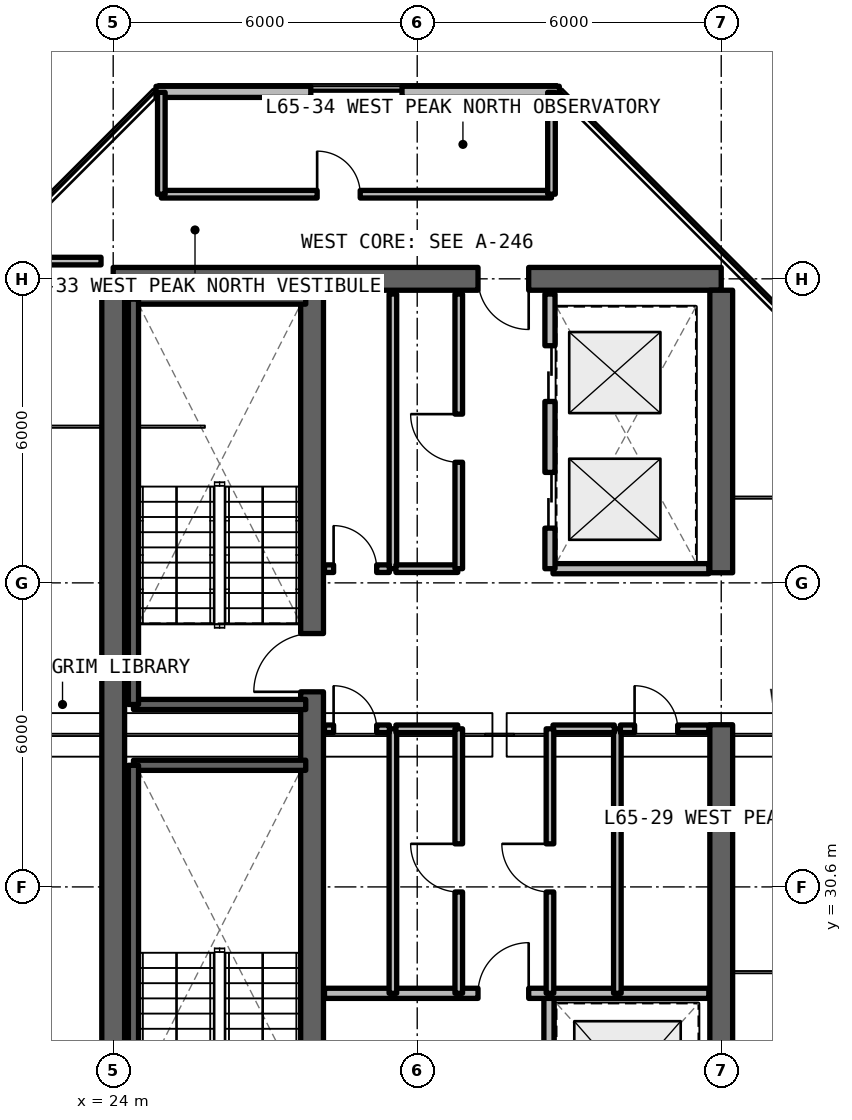
"""IFC4 building model, lengths in metres.
Left out: names, types, materials, properties, quantities, classifications, styles, units other than length and angle.
Written with IfcOpenShell. Run it as: python <this file> out.ifc"""

import sys

from ifc_helpers import new_model, si_unit, direction, frame, frame_2d, origin, place, context, subcontext, project, spatial, rectangle, extrude, element, fill, save


model = new_model("IFC4")
c1 = context("Model", 3, precision=1e-05, world=origin(), true_north=direction((0.0, 1.0)))
c2 = subcontext(c1, "Body", "Model", "MODEL_VIEW")
j1 = project(units=[si_unit("LENGTHUNIT", "METRE"), si_unit("PLANEANGLEUNIT", "RADIAN")], contexts=[c1])
p1 = place(None, origin())
s1 = spatial("IfcSite", under=j1, at=p1, CompositionType="ELEMENT")
p2 = place(p1, origin())
s2 = spatial("IfcBuilding", under=s1, at=p2, CompositionType="ELEMENT")
p3 = place(p2, frame((0.0, 0.0, 232.65)))
s3 = spatial("IfcBuildingStorey", under=s2, at=p3, CompositionType="ELEMENT", Elevation=232.65)
p4 = place(p3, frame((36.0, 42.6, 0.0), z_axis=(0.0, 0.0, 1.0), x_axis=(-1.0, 0.0, 0.0)))
e1 = element("IfcWall", 1, at=p4, inside=s3, PredefinedType="SHEAR", context=c2, shape_type="SweptSolid", body=[
    extrude(rectangle(XDim=12.0, YDim=0.45, at=frame_2d((6.0, 0.0))), origin(), (0.0, 0.0, 1.0), 3.3),
])
p5 = place(p4, frame((3.8, 0.0, 0.0)))
e2 = element("IfcOpeningElement", 2, at=p5, cuts=e1, PredefinedType="OPENING", context=c2, shape_type="SweptSolid", body=[
    extrude(rectangle(XDim=1.0, YDim=2.15, at=frame_2d((0.5, 1.075))), frame((0.0, 0.235, 0.0), z_axis=(0.0, -1.0, 0.0), x_axis=(1.0, 0.0, 0.0)), (0.0, 0.0, 1.0), 0.47),
])
p6 = place(p3, frame((24.0, 24.825, 0.0), z_axis=(0.0, 0.0, 1.0), x_axis=(0.0, 1.0, 0.0)))
e3 = element("IfcWall", 3, at=p6, inside=s3, PredefinedType="SHEAR", context=c2, shape_type="SweptSolid", body=[
    extrude(rectangle(XDim=17.55, YDim=0.45, at=frame_2d((8.775, 0.0))), origin(), (0.0, 0.0, 1.0), 3.3),
])
p7 = place(p3, frame((36.0, 24.825, 0.0), z_axis=(0.0, 0.0, 1.0), x_axis=(0.0, 1.0, 0.0)))
e4 = element("IfcWall", 4, at=p7, inside=s3, PredefinedType="SHEAR", context=c2, shape_type="SweptSolid", body=[
    extrude(rectangle(XDim=8.975, YDim=0.45, at=frame_2d((4.488, 0.0))), origin(), (0.0, 0.0, 1.0), 3.3),
])
p8 = place(p3, frame((36.0, 36.8, 0.0), z_axis=(0.0, 0.0, 1.0), x_axis=(0.0, 1.0, 0.0)))
e5 = element("IfcWall", 5, at=p8, inside=s3, PredefinedType="SHEAR", context=c2, shape_type="SweptSolid", body=[
    extrude(rectangle(XDim=5.575, YDim=0.45, at=frame_2d((2.788, 0.0))), origin(), (0.0, 0.0, 1.0), 3.3),
])
p9 = place(p3, frame((27.925, 24.825, 0.0), z_axis=(0.0, 0.0, 1.0), x_axis=(0.0, 1.0, 0.0)))
e6 = element("IfcWall", 6, at=p9, inside=s3, PredefinedType="SHEAR", context=c2, shape_type="SweptSolid", body=[
    extrude(rectangle(XDim=17.55, YDim=0.45, at=frame_2d((8.775, 0.0))), origin(), (0.0, 0.0, 1.0), 3.3),
])
p10 = place(p9, frame((0.425, 0.0, 0.0)))
e7 = element("IfcOpeningElement", 7, at=p10, cuts=e6, PredefinedType="OPENING", context=c2, shape_type="SweptSolid", body=[
    extrude(rectangle(XDim=1.15, YDim=2.15, at=frame_2d((0.575, 1.075))), frame((0.0, 0.235, 0.0), z_axis=(0.0, -1.0, 0.0), x_axis=(1.0, 0.0, 0.0)), (0.0, 0.0, 1.0), 0.47),
])
p11 = place(p9, frame((9.625, 0.0, 0.0)))
e8 = element("IfcOpeningElement", 8, at=p11, cuts=e6, PredefinedType="OPENING", context=c2, shape_type="SweptSolid", body=[
    extrude(rectangle(XDim=1.15, YDim=2.15, at=frame_2d((0.575, 1.075))), frame((0.0, 0.235, 0.0), z_axis=(0.0, -1.0, 0.0), x_axis=(1.0, 0.0, 0.0)), (0.0, 0.0, 1.0), 0.47),
])
p12 = place(p3, frame((32.804, 46.29, 0.0), z_axis=(0.0, 0.0, 1.0), x_axis=(-1.0, 0.0, 0.0)))
e9 = element("IfcWall", 9, at=p12, inside=s3, PredefinedType="SOLIDWALL", context=c2, shape_type="SweptSolid", body=[
    extrude(rectangle(XDim=7.959, YDim=0.22, at=frame_2d((3.979, 0.0))), origin(), (0.0, 0.0, 1.0), 3.08),
])
p13 = place(p12, frame((3.104, 0.0, 0.78)))
e10 = element("IfcOpeningElement", 10, at=p13, cuts=e9, PredefinedType="OPENING", context=c2, shape_type="SweptSolid", body=[
    extrude(rectangle(XDim=1.8, YDim=1.66, at=frame_2d((0.9, 0.83))), frame((0.0, 0.12, 0.0), z_axis=(0.0, -1.0, 0.0), x_axis=(1.0, 0.0, 0.0)), (0.0, 0.0, 1.0), 0.24),
])
p14 = place(p3, frame((32.6, 24.92, 0.0), z_axis=(0.0, 0.0, 1.0), x_axis=(0.0, 1.0, 0.0)))
e11 = element("IfcWall", 11, at=p14, inside=s3, PredefinedType="SOLIDWALL", context=c2, shape_type="SweptSolid", body=[
    extrude(rectangle(XDim=3.58, YDim=0.2, at=frame_2d((1.79, 0.0))), origin(), (0.0, 0.0, 1.0), 2.35),
])
p15 = place(p14, frame((1.3, 0.0, 0.0)))
e12 = element("IfcOpeningElement", 12, at=p15, cuts=e11, PredefinedType="OPENING", context=c2, shape_type="SweptSolid", body=[
    extrude(rectangle(XDim=1.1, YDim=2.2, at=frame_2d((0.55, 1.1))), frame((0.0, 0.11, 0.0), z_axis=(0.0, -1.0, 0.0), x_axis=(1.0, 0.0, 0.0)), (0.0, 0.0, 1.0), 0.22),
])
p16 = place(p3, frame((28.17, 28.5, 0.0), z_axis=(0.0, 0.0, 1.0), x_axis=(1.0, 0.0, 0.0)))
e13 = element("IfcWall", 13, at=p16, inside=s3, PredefinedType="SOLIDWALL", context=c2, shape_type="SweptSolid", body=[
    extrude(rectangle(XDim=7.585, YDim=0.2, at=frame_2d((3.792, 0.0))), origin(), (0.0, 0.0, 1.0), 2.35),
])
p17 = place(p16, frame((3.03, 0.0, 0.0)))
e14 = element("IfcOpeningElement", 14, at=p17, cuts=e13, PredefinedType="OPENING", context=c2, shape_type="SweptSolid", body=[
    extrude(rectangle(XDim=1.0, YDim=2.15, at=frame_2d((0.5, 1.075))), frame((0.0, 0.11, 0.0), z_axis=(0.0, -1.0, 0.0), x_axis=(1.0, 0.0, 0.0)), (0.0, 0.0, 1.0), 0.22),
])
p18 = place(p3, frame((29.52, 28.5, 0.0), z_axis=(0.0, 0.0, 1.0), x_axis=(0.0, 1.0, 0.0)))
e15 = element("IfcWall", 15, at=p18, inside=s3, PredefinedType="SOLIDWALL", context=c2, shape_type="SweptSolid", body=[
    extrude(rectangle(XDim=5.22, YDim=0.15, at=frame_2d((2.61, 0.0))), origin(), (0.0, 0.0, 1.0), 2.35),
])
p19 = place(p3, frame((28.17, 33.72, 0.0), z_axis=(0.0, 0.0, 1.0), x_axis=(1.0, 0.0, 0.0)))
e16 = element("IfcWall", 16, at=p19, inside=s3, PredefinedType="SOLIDWALL", context=c2, shape_type="SweptSolid", body=[
    extrude(rectangle(XDim=1.28, YDim=0.15, at=frame_2d((0.64, 0.0))), origin(), (0.0, 0.0, 1.0), 2.35),
])
p20 = place(p19, frame((0.18, 0.0, 0.0)))
e17 = element("IfcOpeningElement", 17, at=p20, cuts=e16, PredefinedType="OPENING", context=c2, shape_type="SweptSolid", body=[
    extrude(rectangle(XDim=0.85, YDim=2.1, at=frame_2d((0.425, 1.05))), frame((0.0, 0.085, 0.0), z_axis=(0.0, -1.0, 0.0), x_axis=(1.0, 0.0, 0.0)), (0.0, 0.0, 1.0), 0.17),
])
p21 = place(p3, frame((29.58, 33.72, 0.0), z_axis=(0.0, 0.0, 1.0), x_axis=(1.0, 0.0, 0.0)))
e18 = element("IfcWall", 18, at=p21, inside=s3, PredefinedType="SOLIDWALL", context=c2, shape_type="SweptSolid", body=[
    extrude(rectangle(XDim=1.22, YDim=0.15, at=frame_2d((0.61, 0.0))), origin(), (0.0, 0.0, 1.0), 2.35),
])
p22 = place(p3, frame((30.82, 28.5, 0.0), z_axis=(0.0, 0.0, 1.0), x_axis=(0.0, 1.0, 0.0)))
e19 = element("IfcWall", 19, at=p22, inside=s3, PredefinedType="SOLIDWALL", context=c2, shape_type="SweptSolid", body=[
    extrude(rectangle(XDim=5.22, YDim=0.15, at=frame_2d((2.61, 0.0))), origin(), (0.0, 0.0, 1.0), 2.35),
])
p23 = place(p22, frame((2.0, 0.0, 0.0)))
e20 = element("IfcOpeningElement", 20, at=p23, cuts=e19, PredefinedType="OPENING", context=c2, shape_type="SweptSolid", body=[
    extrude(rectangle(XDim=0.95, YDim=2.15, at=frame_2d((0.475, 1.075))), frame((0.0, 0.085, 0.0), z_axis=(0.0, -1.0, 0.0), x_axis=(1.0, 0.0, 0.0)), (0.0, 0.0, 1.0), 0.17),
])
p24 = place(p3, frame((33.95, 28.5, 0.0), z_axis=(0.0, 0.0, 1.0), x_axis=(0.0, 1.0, 0.0)))
e21 = element("IfcWall", 21, at=p24, inside=s3, PredefinedType="SOLIDWALL", context=c2, shape_type="SweptSolid", body=[
    extrude(rectangle(XDim=5.22, YDim=0.15, at=frame_2d((2.61, 0.0))), origin(), (0.0, 0.0, 1.0), 2.35),
])
p25 = place(p3, frame((32.68, 33.72, 0.0), z_axis=(0.0, 0.0, 1.0), x_axis=(1.0, 0.0, 0.0)))
e22 = element("IfcWall", 22, at=p25, inside=s3, PredefinedType="SOLIDWALL", context=c2, shape_type="SweptSolid", body=[
    extrude(rectangle(XDim=1.21, YDim=0.15, at=frame_2d((0.605, 0.0))), origin(), (0.0, 0.0, 1.0), 2.35),
])
p26 = place(p3, frame((34.01, 33.72, 0.0), z_axis=(0.0, 0.0, 1.0), x_axis=(1.0, 0.0, 0.0)))
e23 = element("IfcWall", 23, at=p26, inside=s3, PredefinedType="SOLIDWALL", context=c2, shape_type="SweptSolid", body=[
    extrude(rectangle(XDim=1.745, YDim=0.15, at=frame_2d((0.873, 0.0))), origin(), (0.0, 0.0, 1.0), 2.35),
])
p27 = place(p26, frame((0.28, 0.0, 0.0)))
e24 = element("IfcOpeningElement", 24, at=p27, cuts=e23, PredefinedType="OPENING", context=c2, shape_type="SweptSolid", body=[
    extrude(rectangle(XDim=0.85, YDim=2.1, at=frame_2d((0.425, 1.05))), frame((0.0, 0.085, 0.0), z_axis=(0.0, -1.0, 0.0), x_axis=(1.0, 0.0, 0.0)), (0.0, 0.0, 1.0), 0.17),
])
p28 = place(p3, frame((32.62, 28.5, 0.0), z_axis=(0.0, 0.0, 1.0), x_axis=(0.0, 1.0, 0.0)))
e25 = element("IfcWall", 25, at=p28, inside=s3, PredefinedType="SOLIDWALL", context=c2, shape_type="SweptSolid", body=[
    extrude(rectangle(XDim=5.22, YDim=0.15, at=frame_2d((2.61, 0.0))), origin(), (0.0, 0.0, 1.0), 2.35),
])
p29 = place(p28, frame((2.0, 0.0, 0.0)))
e26 = element("IfcOpeningElement", 26, at=p29, cuts=e25, PredefinedType="OPENING", context=c2, shape_type="SweptSolid", body=[
    extrude(rectangle(XDim=0.95, YDim=2.15, at=frame_2d((0.475, 1.075))), frame((0.0, 0.085, 0.0), z_axis=(0.0, -1.0, 0.0), x_axis=(1.0, 0.0, 0.0)), (0.0, 0.0, 1.0), 0.17),
])
p30 = place(p3, frame((29.52, 36.88, 0.0), z_axis=(0.0, 0.0, 1.0), x_axis=(0.0, 1.0, 0.0)))
e27 = element("IfcWall", 27, at=p30, inside=s3, PredefinedType="SOLIDWALL", context=c2, shape_type="SweptSolid", body=[
    extrude(rectangle(XDim=5.42, YDim=0.15, at=frame_2d((2.71, 0.0))), origin(), (0.0, 0.0, 1.0), 2.35),
])
p31 = place(p3, frame((28.17, 36.88, 0.0), z_axis=(0.0, 0.0, 1.0), x_axis=(1.0, 0.0, 0.0)))
e28 = element("IfcWall", 28, at=p31, inside=s3, PredefinedType="SOLIDWALL", context=c2, shape_type="SweptSolid", body=[
    extrude(rectangle(XDim=1.28, YDim=0.15, at=frame_2d((0.64, 0.0))), origin(), (0.0, 0.0, 1.0), 2.35),
])
p32 = place(p31, frame((0.18, 0.0, 0.0)))
e29 = element("IfcOpeningElement", 29, at=p32, cuts=e28, PredefinedType="OPENING", context=c2, shape_type="SweptSolid", body=[
    extrude(rectangle(XDim=0.85, YDim=2.1, at=frame_2d((0.425, 1.05))), frame((0.0, 0.085, 0.0), z_axis=(0.0, -1.0, 0.0), x_axis=(1.0, 0.0, 0.0)), (0.0, 0.0, 1.0), 0.17),
])
p33 = place(p3, frame((29.58, 36.88, 0.0), z_axis=(0.0, 0.0, 1.0), x_axis=(1.0, 0.0, 0.0)))
e30 = element("IfcWall", 30, at=p33, inside=s3, PredefinedType="SOLIDWALL", context=c2, shape_type="SweptSolid", body=[
    extrude(rectangle(XDim=1.22, YDim=0.15, at=frame_2d((0.61, 0.0))), origin(), (0.0, 0.0, 1.0), 2.35),
])
p34 = place(p3, frame((30.82, 36.88, 0.0), z_axis=(0.0, 0.0, 1.0), x_axis=(0.0, 1.0, 0.0)))
e31 = element("IfcWall", 31, at=p34, inside=s3, PredefinedType="SOLIDWALL", context=c2, shape_type="SweptSolid", body=[
    extrude(rectangle(XDim=5.42, YDim=0.15, at=frame_2d((2.71, 0.0))), origin(), (0.0, 0.0, 1.0), 2.35),
])
p35 = place(p34, frame((2.1, 0.0, 0.0)))
e32 = element("IfcOpeningElement", 32, at=p35, cuts=e31, PredefinedType="OPENING", context=c2, shape_type="SweptSolid", body=[
    extrude(rectangle(XDim=0.95, YDim=2.15, at=frame_2d((0.475, 1.075))), frame((0.0, 0.085, 0.0), z_axis=(0.0, -1.0, 0.0), x_axis=(1.0, 0.0, 0.0)), (0.0, 0.0, 1.0), 0.17),
])
p36 = place(p3, frame((32.68, 36.88, 0.0), z_axis=(0.0, 0.0, 1.0), x_axis=(1.0, 0.0, 0.0)))
e33 = element("IfcWall", 33, at=p36, inside=s3, PredefinedType="SOLIDWALL", context=c2, shape_type="SweptSolid", body=[
    extrude(rectangle(XDim=3.075, YDim=0.2, at=frame_2d((1.538, 0.0))), origin(), (0.0, 0.0, 1.0), 2.35),
])
p37 = place(p3, frame((32.62, 36.88, 0.0), z_axis=(0.0, 0.0, 1.0), x_axis=(0.0, 1.0, 0.0)))
e34 = element("IfcWall", 34, at=p37, inside=s3, PredefinedType="SOLIDWALL", context=c2, shape_type="SweptSolid", body=[
    extrude(rectangle(XDim=5.42, YDim=0.2, at=frame_2d((2.71, 0.0))), origin(), (0.0, 0.0, 1.0), 2.35),
])
p38 = place(p37, frame((0.8, 0.0, 0.0)))
e35 = element("IfcOpeningElement", 35, at=p38, cuts=e34, PredefinedType="OPENING", context=c2, shape_type="SweptSolid", body=[
    extrude(rectangle(XDim=1.1, YDim=2.2, at=frame_2d((0.55, 1.1))), frame((0.0, 0.11, 0.0), z_axis=(0.0, -1.0, 0.0), x_axis=(1.0, 0.0, 0.0)), (0.0, 0.0, 1.0), 0.22),
])
p39 = place(p37, frame((3.3, 0.0, 0.0)))
e36 = element("IfcOpeningElement", 36, at=p39, cuts=e34, PredefinedType="OPENING", context=c2, shape_type="SweptSolid", body=[
    extrude(rectangle(XDim=1.1, YDim=2.2, at=frame_2d((0.55, 1.1))), frame((0.0, 0.11, 0.0), z_axis=(0.0, -1.0, 0.0), x_axis=(1.0, 0.0, 0.0)), (0.0, 0.0, 1.0), 0.22),
])
p40 = place(p3, frame((22.12, 42.95, 0.0), z_axis=(0.0, 0.0, 1.0), x_axis=(1.0, 0.0, 0.0)))
e37 = element("IfcWall", 37, at=p40, inside=s3, PredefinedType="SOLIDWALL", context=c2, shape_type="SweptSolid", body=[
    extrude(rectangle(XDim=1.64, YDim=0.15, at=frame_2d((0.82, 0.0))), origin(), (0.0, 0.0, 1.0), 2.35),
])
p41 = place(p3, frame((24.95, 44.27, 0.0), z_axis=(0.0, 0.0, 1.0), x_axis=(1.0, 0.0, 0.0)))
e38 = element("IfcWall", 38, at=p41, inside=s3, PredefinedType="SOLIDWALL", context=c2, shape_type="SweptSolid", body=[
    extrude(rectangle(XDim=7.7, YDim=0.15, at=frame_2d((3.85, 0.0))), origin(), (0.0, 0.0, 1.0), 2.35),
])
p42 = place(p41, frame((3.075, 0.0, 0.0)))
e39 = element("IfcOpeningElement", 39, at=p42, cuts=e38, PredefinedType="OPENING", context=c2, shape_type="SweptSolid", body=[
    extrude(rectangle(XDim=0.85, YDim=2.1, at=frame_2d((0.425, 1.05))), frame((0.0, 0.085, 0.0), z_axis=(0.0, -1.0, 0.0), x_axis=(1.0, 0.0, 0.0)), (0.0, 0.0, 1.0), 0.17),
])
for number, where, z_axis, x_axis in (
    (40, (24.95, 44.27, 0.0), (0.0, 0.0, 1.0), (0.0, 1.0, 0.0)),
    (41, (32.65, 44.27, 0.0), (0.0, 0.0, 1.0), (0.0, 1.0, 0.0)),
):
    element("IfcWall", number, at=place(p3, frame(where, z_axis=z_axis, x_axis=x_axis)), inside=s3, PredefinedType="SOLIDWALL", context=c2, shape_type="SweptSolid", body=[
        extrude(rectangle(XDim=2.01, YDim=0.15, at=frame_2d((1.005, 0.0))), origin(), (0.0, 0.0, 1.0), 2.35),
    ])
p43 = place(p3, frame((27.8, 33.0, 0.0), z_axis=(0.0, 0.0, 1.0), x_axis=(-1.0, 0.0, 0.0)))
e42 = element("IfcWall", 42, at=p43, inside=s3, PredefinedType="SOLIDWALL", context=c2, shape_type="SweptSolid", body=[
    extrude(rectangle(XDim=3.4, YDim=0.2, at=frame_2d((1.7, 0.0))), origin(), (0.0, 0.0, 1.0), 3.3),
])
p44 = place(p3, frame((24.4, 33.0, 0.0), z_axis=(0.0, 0.0, 1.0), x_axis=(0.0, -1.0, 0.0)))
e43 = element("IfcWall", 43, at=p44, inside=s3, PredefinedType="SOLIDWALL", context=c2, shape_type="SweptSolid", body=[
    extrude(rectangle(XDim=8.0, YDim=0.2, at=frame_2d((4.0, 0.0))), origin(), (0.0, 0.0, 1.0), 3.3),
])
for number, where, z_axis, x_axis in (
    (44, (24.4, 34.2, 0.0), (0.0, 0.0, 1.0), (1.0, 0.0, 0.0)),
    (45, (27.8, 42.2, 0.0), (0.0, 0.0, 1.0), (-1.0, 0.0, 0.0)),
):
    element("IfcWall", number, at=place(p3, frame(where, z_axis=z_axis, x_axis=x_axis)), inside=s3, PredefinedType="SOLIDWALL", context=c2, shape_type="SweptSolid", body=[
        extrude(rectangle(XDim=3.4, YDim=0.2, at=frame_2d((1.7, 0.0))), origin(), (0.0, 0.0, 1.0), 3.3),
    ])
p45 = place(p3, frame((24.4, 42.2, 0.0), z_axis=(0.0, 0.0, 1.0), x_axis=(0.0, -1.0, 0.0)))
e46 = element("IfcWall", 46, at=p45, inside=s3, PredefinedType="SOLIDWALL", context=c2, shape_type="SweptSolid", body=[
    extrude(rectangle(XDim=8.0, YDim=0.2, at=frame_2d((4.0, 0.0))), origin(), (0.0, 0.0, 1.0), 3.3),
])
p46 = place(p13, origin())
e47 = element("IfcWindow", 47, at=p46, inside=s3, PartitioningType="SINGLE_PANEL", PredefinedType="WINDOW", context=c2, shape_type="SweptSolid", body=[
    extrude(rectangle(XDim=1.8, YDim=1.66, at=frame_2d((0.9, 0.83))), frame((0.0, 0.03, 0.0), z_axis=(0.0, -1.0, 0.0), x_axis=(1.0, 0.0, 0.0)), (0.0, 0.0, 1.0), 0.06),
])
fill(e10, e47)
p47 = place(p17, origin())
e48 = element("IfcDoor", 48, at=p47, inside=s3, OperationType="SINGLE_SWING_RIGHT", PredefinedType="DOOR", context=c2, shape_type="SweptSolid", body=[
    extrude(rectangle(XDim=1.0, YDim=2.15, at=frame_2d((0.5, 1.075))), frame((0.0, 0.025, 0.0), z_axis=(0.0, -1.0, 0.0), x_axis=(1.0, 0.0, 0.0)), (0.0, 0.0, 1.0), 0.05),
])
fill(e14, e48)
p48 = place(p20, origin())
e49 = element("IfcDoor", 49, at=p48, inside=s3, OperationType="SINGLE_SWING_LEFT", PredefinedType="DOOR", context=c2, shape_type="SweptSolid", body=[
    extrude(rectangle(XDim=0.85, YDim=2.1, at=frame_2d((0.425, 1.05))), frame((0.0, 0.025, 0.0), z_axis=(0.0, -1.0, 0.0), x_axis=(1.0, 0.0, 0.0)), (0.0, 0.0, 1.0), 0.05),
])
fill(e17, e49)
p49 = place(p23, origin())
e50 = element("IfcDoor", 50, at=p49, inside=s3, OperationType="SINGLE_SWING_RIGHT", PredefinedType="DOOR", context=c2, shape_type="SweptSolid", body=[
    extrude(rectangle(XDim=0.95, YDim=2.15, at=frame_2d((0.475, 1.075))), frame((0.0, 0.025, 0.0), z_axis=(0.0, -1.0, 0.0), x_axis=(1.0, 0.0, 0.0)), (0.0, 0.0, 1.0), 0.05),
])
fill(e20, e50)
p50 = place(p27, origin())
e51 = element("IfcDoor", 51, at=p50, inside=s3, OperationType="SINGLE_SWING_LEFT", PredefinedType="DOOR", context=c2, shape_type="SweptSolid", body=[
    extrude(rectangle(XDim=0.85, YDim=2.1, at=frame_2d((0.425, 1.05))), frame((0.0, 0.025, 0.0), z_axis=(0.0, -1.0, 0.0), x_axis=(1.0, 0.0, 0.0)), (0.0, 0.0, 1.0), 0.05),
])
fill(e24, e51)
p51 = place(p29, origin())
e52 = element("IfcDoor", 52, at=p51, inside=s3, OperationType="SINGLE_SWING_RIGHT", PredefinedType="DOOR", context=c2, shape_type="SweptSolid", body=[
    extrude(rectangle(XDim=0.95, YDim=2.15, at=frame_2d((0.475, 1.075))), frame((0.0, 0.025, 0.0), z_axis=(0.0, -1.0, 0.0), x_axis=(1.0, 0.0, 0.0)), (0.0, 0.0, 1.0), 0.05),
])
fill(e26, e52)
p52 = place(p32, origin())
e53 = element("IfcDoor", 53, at=p52, inside=s3, OperationType="SINGLE_SWING_LEFT", PredefinedType="DOOR", context=c2, shape_type="SweptSolid", body=[
    extrude(rectangle(XDim=0.85, YDim=2.1, at=frame_2d((0.425, 1.05))), frame((0.0, 0.025, 0.0), z_axis=(0.0, -1.0, 0.0), x_axis=(1.0, 0.0, 0.0)), (0.0, 0.0, 1.0), 0.05),
])
fill(e29, e53)
p53 = place(p35, origin())
e54 = element("IfcDoor", 54, at=p53, inside=s3, OperationType="SINGLE_SWING_RIGHT", PredefinedType="DOOR", context=c2, shape_type="SweptSolid", body=[
    extrude(rectangle(XDim=0.95, YDim=2.15, at=frame_2d((0.475, 1.075))), frame((0.0, 0.025, 0.0), z_axis=(0.0, -1.0, 0.0), x_axis=(1.0, 0.0, 0.0)), (0.0, 0.0, 1.0), 0.05),
])
fill(e32, e54)
p54 = place(p38, origin())
e55 = element("IfcDoor", 55, at=p54, inside=s3, OperationType="SLIDING_TO_LEFT", PredefinedType="DOOR", context=c2, shape_type="SweptSolid", body=[
    extrude(rectangle(XDim=1.1, YDim=2.2, at=frame_2d((0.55, 1.1))), frame((0.0, 0.025, 0.0), z_axis=(0.0, -1.0, 0.0), x_axis=(1.0, 0.0, 0.0)), (0.0, 0.0, 1.0), 0.05),
])
fill(e35, e55)
p55 = place(p39, origin())
e56 = element("IfcDoor", 56, at=p55, inside=s3, OperationType="SLIDING_TO_RIGHT", PredefinedType="DOOR", context=c2, shape_type="SweptSolid", body=[
    extrude(rectangle(XDim=1.1, YDim=2.2, at=frame_2d((0.55, 1.1))), frame((0.0, 0.025, 0.0), z_axis=(0.0, -1.0, 0.0), x_axis=(1.0, 0.0, 0.0)), (0.0, 0.0, 1.0), 0.05),
])
fill(e36, e56)
p56 = place(p42, origin())
e57 = element("IfcDoor", 57, at=p56, inside=s3, OperationType="SINGLE_SWING_LEFT", PredefinedType="DOOR", context=c2, shape_type="SweptSolid", body=[
    extrude(rectangle(XDim=0.85, YDim=2.1, at=frame_2d((0.425, 1.05))), frame((0.0, 0.025, 0.0), z_axis=(0.0, -1.0, 0.0), x_axis=(1.0, 0.0, 0.0)), (0.0, 0.0, 1.0), 0.05),
])
fill(e39, e57)
p57 = place(p11, origin())
e58 = element("IfcDoor", 58, at=p57, inside=s3, OperationType="SINGLE_SWING_LEFT", PredefinedType="DOOR", context=c2, shape_type="SweptSolid", body=[
    extrude(rectangle(XDim=1.15, YDim=2.15, at=frame_2d((0.575, 1.075))), frame((0.0, 0.025, 0.0), z_axis=(0.0, -1.0, 0.0), x_axis=(1.0, 0.0, 0.0)), (0.0, 0.0, 1.0), 0.05),
])
fill(e8, e58)
p58 = place(p5, origin())
e59 = element("IfcDoor", 59, at=p58, inside=s3, OperationType="SINGLE_SWING_RIGHT", PredefinedType="DOOR", context=c2, shape_type="SweptSolid", body=[
    extrude(rectangle(XDim=1.0, YDim=2.15, at=frame_2d((0.5, 1.075))), frame((0.0, 0.025, 0.0), z_axis=(0.0, -1.0, 0.0), x_axis=(1.0, 0.0, 0.0)), (0.0, 0.0, 1.0), 0.05),
])
fill(e2, e59)
save(model, sys.argv[1])
